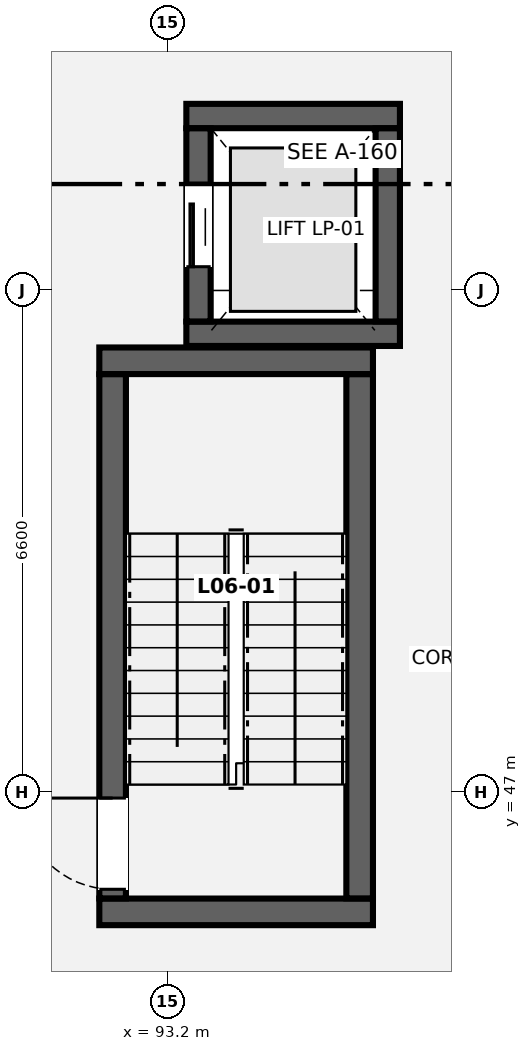
"""IFC4 building model, lengths in metres.
Left out: names, types, materials, properties, quantities, classifications, styles, units other than length and angle.
Written with IfcOpenShell. Run it as: python <this file> out.ifc"""

import sys

from ifc_helpers import new_model, si_unit, direction, frame, frame_2d, origin, place, context, subcontext, project, spatial, rectangle, extrude, element, fill, save


model = new_model("IFC4")
c1 = context("Model", 3, precision=1e-05, world=origin(), true_north=direction((0.0, 1.0)))
c2 = subcontext(c1, "Body", "Model", "MODEL_VIEW")
j1 = project(units=[si_unit("LENGTHUNIT", "METRE"), si_unit("PLANEANGLEUNIT", "RADIAN")], contexts=[c1])
p1 = place(None, origin())
s1 = spatial("IfcSite", under=j1, at=p1, CompositionType="ELEMENT")
p2 = place(p1, origin())
s2 = spatial("IfcBuilding", under=s1, at=p2, CompositionType="ELEMENT")
p3 = place(p2, frame((0.0, 0.0, 25.9)))
s3 = spatial("IfcBuildingStorey", under=s2, at=p3, CompositionType="ELEMENT", Elevation=25.9)
for number, where, z_axis, x_axis in (
    (1, (92.3, 45.425, 0.0), (0.0, 0.0, 1.0), (1.0, 0.0, 0.0)),
    (2, (92.3, 52.675, 0.0), (0.0, 0.0, 1.0), (1.0, 0.0, 0.0)),
):
    element("IfcWall", number, at=place(p3, frame(where, z_axis=z_axis, x_axis=x_axis)), inside=s3, PredefinedType="SHEAR", context=c2, shape_type="SweptSolid", body=[
        extrude(rectangle(XDim=3.6, YDim=0.35, at=frame_2d((1.8, 0.0))), origin(), (0.0, 0.0, 1.0), 4.0),
    ])
p4 = place(p3, frame((92.475, 45.602, 0.0), z_axis=(0.0, 0.0, 1.0), x_axis=(0.0, 1.0, 0.0)))
e3 = element("IfcWall", 3, at=p4, inside=s3, PredefinedType="SHEAR", context=c2, shape_type="SweptSolid", body=[
    extrude(rectangle(XDim=6.896, YDim=0.35, at=frame_2d((3.448, 0.0))), origin(), (0.0, 0.0, 1.0), 4.0),
])
p5 = place(p4, frame((0.12, 0.0, 0.0)))
e4 = element("IfcOpeningElement", 4, at=p5, cuts=e3, PredefinedType="OPENING", context=c2, shape_type="SweptSolid", body=[
    extrude(rectangle(XDim=1.2, YDim=2.15, at=frame_2d((0.6, 1.075))), frame((0.0, 0.185, 0.0), z_axis=(0.0, -1.0, 0.0), x_axis=(1.0, 0.0, 0.0)), (0.0, 0.0, 1.0), 0.37),
])
p6 = place(p3, frame((95.725, 45.602, 0.0), z_axis=(0.0, 0.0, 1.0), x_axis=(0.0, 1.0, 0.0)))
e5 = element("IfcWall", 5, at=p6, inside=s3, PredefinedType="SHEAR", context=c2, shape_type="SweptSolid", body=[
    extrude(rectangle(XDim=6.896, YDim=0.35, at=frame_2d((3.448, 0.0))), origin(), (0.0, 0.0, 1.0), 4.0),
])
for number, where, z_axis, x_axis in (
    (6, (93.445, 53.03, 0.0), (0.0, 0.0, 1.0), (1.0, 0.0, 0.0)),
    (7, (93.445, 55.895, 0.0), (0.0, 0.0, 1.0), (1.0, 0.0, 0.0)),
):
    element("IfcWall", number, at=place(p3, frame(where, z_axis=z_axis, x_axis=x_axis)), inside=s3, PredefinedType="SHEAR", context=c2, shape_type="SweptSolid", body=[
        extrude(rectangle(XDim=2.81, YDim=0.32, at=frame_2d((1.405, 0.0))), origin(), (0.0, 0.0, 1.0), 4.0),
    ])
p7 = place(p3, frame((93.605, 53.192, 0.0), z_axis=(0.0, 0.0, 1.0), x_axis=(0.0, 1.0, 0.0)))
e8 = element("IfcWall", 8, at=p7, inside=s3, PredefinedType="SHEAR", context=c2, shape_type="SweptSolid", body=[
    extrude(rectangle(XDim=2.541, YDim=0.32, at=frame_2d((1.271, 0.0))), origin(), (0.0, 0.0, 1.0), 4.0),
])
p8 = place(p7, frame((0.72, 0.0, 0.0)))
e9 = element("IfcOpeningElement", 9, at=p8, cuts=e8, PredefinedType="OPENING", context=c2, shape_type="SweptSolid", body=[
    extrude(rectangle(XDim=1.1, YDim=2.15, at=frame_2d((0.55, 1.075))), frame((0.0, 0.17, 0.0), z_axis=(0.0, -1.0, 0.0), x_axis=(1.0, 0.0, 0.0)), (0.0, 0.0, 1.0), 0.34),
])
p9 = place(p3, frame((96.095, 53.192, 0.0), z_axis=(0.0, 0.0, 1.0), x_axis=(0.0, 1.0, 0.0)))
e10 = element("IfcWall", 10, at=p9, inside=s3, PredefinedType="SHEAR", context=c2, shape_type="SweptSolid", body=[
    extrude(rectangle(XDim=2.541, YDim=0.32, at=frame_2d((1.271, 0.0))), origin(), (0.0, 0.0, 1.0), 4.0),
])
p10 = place(p5, origin())
e11 = element("IfcDoor", 11, at=p10, inside=s3, OperationType="SINGLE_SWING_RIGHT", PredefinedType="DOOR", context=c2, shape_type="SweptSolid", body=[
    extrude(rectangle(XDim=1.2, YDim=2.15, at=frame_2d((0.6, 1.075))), frame((0.0, 0.025, 0.0), z_axis=(0.0, -1.0, 0.0), x_axis=(1.0, 0.0, 0.0)), (0.0, 0.0, 1.0), 0.05),
])
fill(e4, e11)
p11 = place(p8, origin())
e12 = element("IfcDoor", 12, at=p11, inside=s3, OperationType="SLIDING_TO_LEFT", PredefinedType="DOOR", context=c2, shape_type="SweptSolid", body=[
    extrude(rectangle(XDim=1.1, YDim=2.15, at=frame_2d((0.55, 1.075))), frame((0.0, 0.025, 0.0), z_axis=(0.0, -1.0, 0.0), x_axis=(1.0, 0.0, 0.0)), (0.0, 0.0, 1.0), 0.05),
])
fill(e9, e12)
save(model, sys.argv[1])
